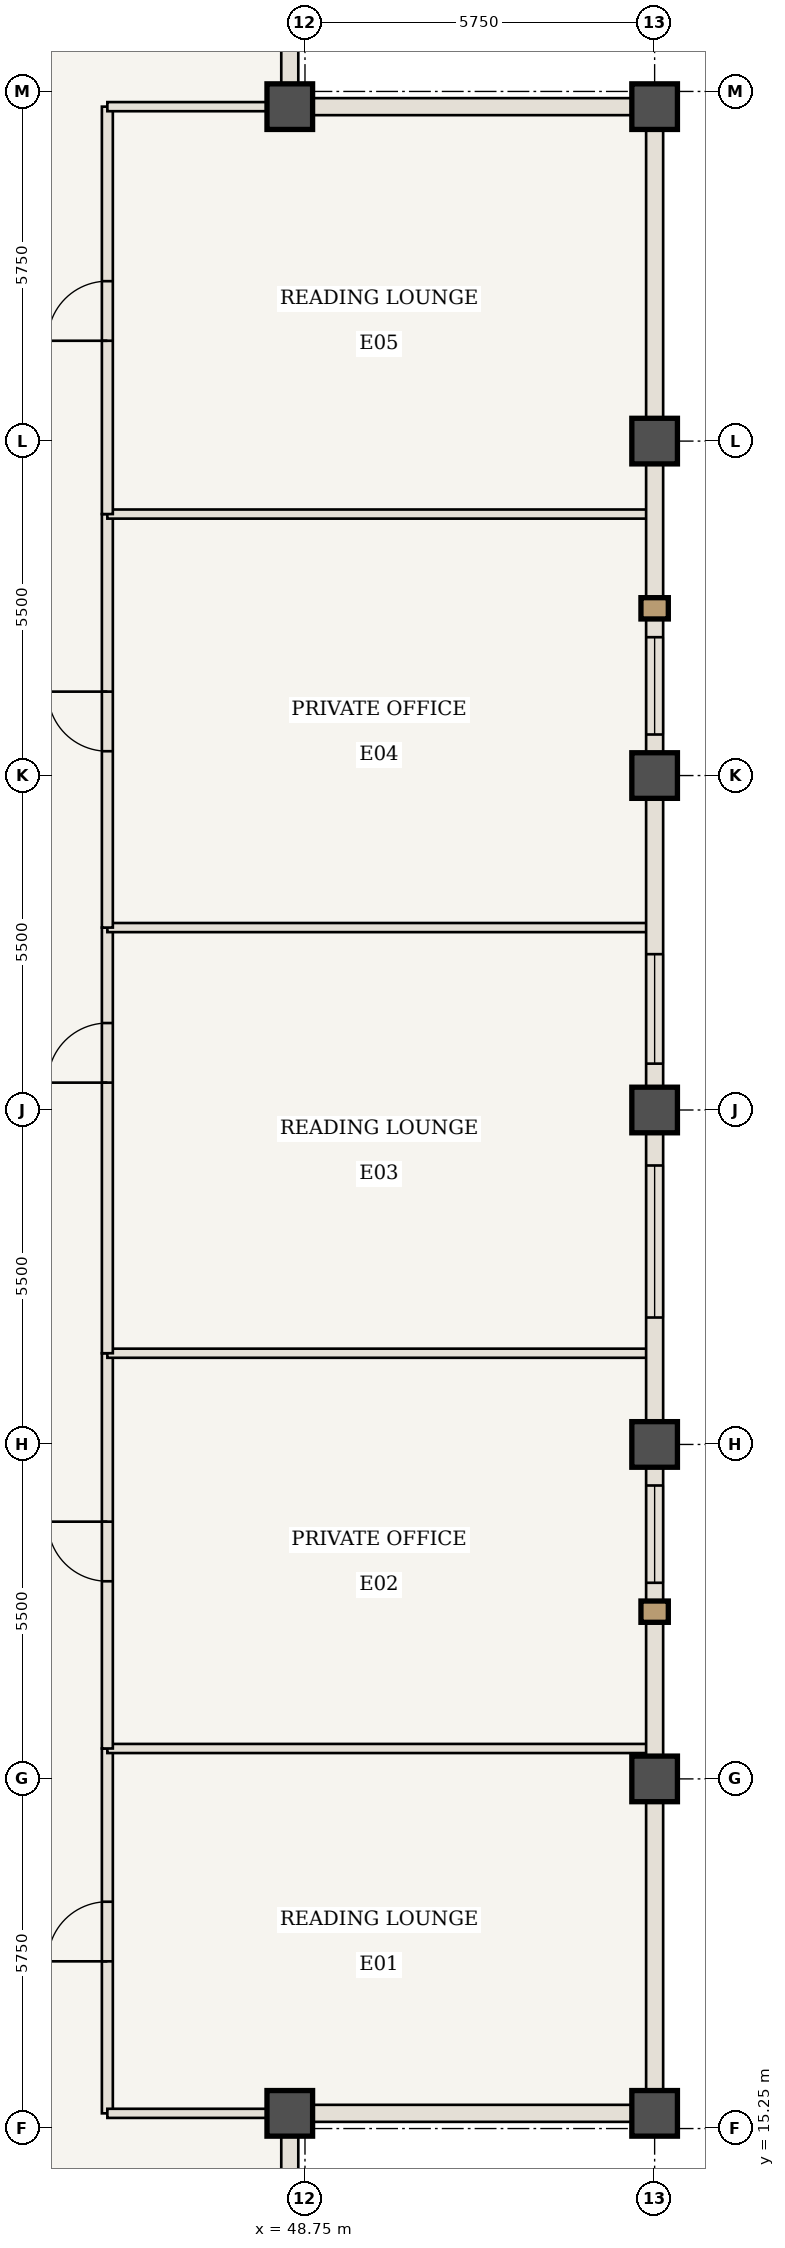
"""IFC4 building model, lengths in metres.
Left out: names, types, materials, properties, quantities, classifications, styles, units other than length and angle.
Written with IfcOpenShell. Run it as: python <this file> out.ifc"""

import sys

from ifc_helpers import new_model, si_unit, direction, frame, frame_2d, origin, origin_2d, place, context, subcontext, project, spatial, rectangle, extrude, element, fill, save


model = new_model("IFC4")
c1 = context("Model", 3, precision=1e-05, world=origin(), true_north=direction((0.0, 1.0)))
c2 = subcontext(c1, "Body", "Model", "MODEL_VIEW")
j1 = project(units=[si_unit("LENGTHUNIT", "METRE"), si_unit("PLANEANGLEUNIT", "RADIAN")], contexts=[c1])
p1 = place(None, origin())
s1 = spatial("IfcSite", under=j1, at=p1, CompositionType="ELEMENT")
p2 = place(p1, origin())
s2 = spatial("IfcBuilding", under=s1, at=p2, CompositionType="ELEMENT")
p3 = place(p2, frame((0.0, 0.0, 292.95)))
s3 = spatial("IfcBuildingStorey", under=s2, at=p3, CompositionType="ELEMENT", Elevation=292.95)
for number, where, z_axis, x_axis in (
    (1, (48.5, 15.5, 0.0), (0.0, 0.0, 1.0), (1.0, 0.0, 0.0)),
    (2, (54.5, 15.5, 0.0), (0.0, 0.0, 1.0), (1.0, 0.0, 0.0)),
    (3, (54.5, 48.5, 0.0), (0.0, 0.0, 1.0), (1.0, 0.0, 0.0)),
    (4, (48.5, 48.5, 0.0), (0.0, 0.0, 1.0), (1.0, 0.0, 0.0)),
    (5, (54.5, 21.0, 0.0), (0.0, 0.0, 1.0), (1.0, 0.0, 0.0)),
    (6, (54.5, 26.5, 0.0), (0.0, 0.0, 1.0), (1.0, 0.0, 0.0)),
    (7, (54.5, 32.0, 0.0), (0.0, 0.0, 1.0), (1.0, 0.0, 0.0)),
    (8, (54.5, 37.5, 0.0), (0.0, 0.0, 1.0), (1.0, 0.0, 0.0)),
    (9, (54.5, 43.0, 0.0), (0.0, 0.0, 1.0), (1.0, 0.0, 0.0)),
):
    element("IfcColumn", number, at=place(p3, frame(where, z_axis=z_axis, x_axis=x_axis)), inside=s3, PredefinedType="COLUMN", context=c2, shape_type="SweptSolid", body=[
        extrude(rectangle(XDim=0.75, YDim=0.75, at=origin_2d()), origin(), (0.0, 0.0, 1.0), 3.85),
    ])
p4 = place(p3, frame((45.5, 15.5, 0.0), z_axis=(0.0, 0.0, 1.0), x_axis=(0.0, 1.0, 0.0)))
e10 = element("IfcWall", 10, at=p4, inside=s3, PredefinedType="STANDARD", context=c2, shape_type="SweptSolid", body=[
    extrude(rectangle(XDim=6.0, YDim=0.18, at=frame_2d((3.0, 0.0))), origin(), (0.0, 0.0, 1.0), 3.685),
])
p5 = place(p4, frame((2.5, 0.0, 0.0)))
e11 = element("IfcOpeningElement", 11, at=p5, cuts=e10, PredefinedType="OPENING", context=c2, shape_type="SweptSolid", body=[
    extrude(rectangle(XDim=0.98, YDim=2.2, at=frame_2d((0.49, 1.1))), frame((0.0, 0.1, 0.0), z_axis=(0.0, -1.0, 0.0), x_axis=(1.0, 0.0, 0.0)), (0.0, 0.0, 1.0), 0.2),
])
p6 = place(p3, frame((45.5, 21.5, 0.0), z_axis=(0.0, 0.0, 1.0), x_axis=(1.0, 0.0, 0.0)))
e12 = element("IfcWall", 12, at=p6, inside=s3, PredefinedType="STANDARD", context=c2, shape_type="SweptSolid", body=[
    extrude(rectangle(XDim=8.94, YDim=0.15, at=frame_2d((4.47, 0.0))), origin(), (0.0, 0.0, 1.0), 3.685),
])
p7 = place(p3, frame((45.5, 21.5, 0.0), z_axis=(0.0, 0.0, 1.0), x_axis=(0.0, 1.0, 0.0)))
e13 = element("IfcWall", 13, at=p7, inside=s3, PredefinedType="STANDARD", context=c2, shape_type="SweptSolid", body=[
    extrude(rectangle(XDim=6.5, YDim=0.18, at=frame_2d((3.25, 0.0))), origin(), (0.0, 0.0, 1.0), 3.685),
])
p8 = place(p7, frame((2.75, 0.0, 0.0)))
e14 = element("IfcOpeningElement", 14, at=p8, cuts=e13, PredefinedType="OPENING", context=c2, shape_type="SweptSolid", body=[
    extrude(rectangle(XDim=0.98, YDim=2.2, at=frame_2d((0.49, 1.1))), frame((0.0, 0.1, 0.0), z_axis=(0.0, -1.0, 0.0), x_axis=(1.0, 0.0, 0.0)), (0.0, 0.0, 1.0), 0.2),
])
p9 = place(p3, frame((45.5, 28.0, 0.0), z_axis=(0.0, 0.0, 1.0), x_axis=(1.0, 0.0, 0.0)))
e15 = element("IfcWall", 15, at=p9, inside=s3, PredefinedType="STANDARD", context=c2, shape_type="SweptSolid", body=[
    extrude(rectangle(XDim=8.94, YDim=0.15, at=frame_2d((4.47, 0.0))), origin(), (0.0, 0.0, 1.0), 3.685),
])
p10 = place(p3, frame((45.5, 28.0, 0.0), z_axis=(0.0, 0.0, 1.0), x_axis=(0.0, 1.0, 0.0)))
e16 = element("IfcWall", 16, at=p10, inside=s3, PredefinedType="STANDARD", context=c2, shape_type="SweptSolid", body=[
    extrude(rectangle(XDim=7.0, YDim=0.18, at=frame_2d((3.5, 0.0))), origin(), (0.0, 0.0, 1.0), 3.685),
])
p11 = place(p10, frame((4.45, 0.0, 0.0)))
e17 = element("IfcOpeningElement", 17, at=p11, cuts=e16, PredefinedType="OPENING", context=c2, shape_type="SweptSolid", body=[
    extrude(rectangle(XDim=0.98, YDim=2.2, at=frame_2d((0.49, 1.1))), frame((0.0, 0.1, 0.0), z_axis=(0.0, -1.0, 0.0), x_axis=(1.0, 0.0, 0.0)), (0.0, 0.0, 1.0), 0.2),
])
p12 = place(p3, frame((45.5, 35.0, 0.0), z_axis=(0.0, 0.0, 1.0), x_axis=(1.0, 0.0, 0.0)))
e18 = element("IfcWall", 18, at=p12, inside=s3, PredefinedType="STANDARD", context=c2, shape_type="SweptSolid", body=[
    extrude(rectangle(XDim=8.94, YDim=0.15, at=frame_2d((4.47, 0.0))), origin(), (0.0, 0.0, 1.0), 3.685),
])
p13 = place(p3, frame((45.5, 35.0, 0.0), z_axis=(0.0, 0.0, 1.0), x_axis=(0.0, 1.0, 0.0)))
e19 = element("IfcWall", 19, at=p13, inside=s3, PredefinedType="STANDARD", context=c2, shape_type="SweptSolid", body=[
    extrude(rectangle(XDim=6.8, YDim=0.18, at=frame_2d((3.4, 0.0))), origin(), (0.0, 0.0, 1.0), 3.685),
])
p14 = place(p13, frame((2.9, 0.0, 0.0)))
e20 = element("IfcOpeningElement", 20, at=p14, cuts=e19, PredefinedType="OPENING", context=c2, shape_type="SweptSolid", body=[
    extrude(rectangle(XDim=0.98, YDim=2.2, at=frame_2d((0.49, 1.1))), frame((0.0, 0.1, 0.0), z_axis=(0.0, -1.0, 0.0), x_axis=(1.0, 0.0, 0.0)), (0.0, 0.0, 1.0), 0.2),
])
p15 = place(p3, frame((45.5, 41.8, 0.0), z_axis=(0.0, 0.0, 1.0), x_axis=(1.0, 0.0, 0.0)))
e21 = element("IfcWall", 21, at=p15, inside=s3, PredefinedType="STANDARD", context=c2, shape_type="SweptSolid", body=[
    extrude(rectangle(XDim=8.94, YDim=0.15, at=frame_2d((4.47, 0.0))), origin(), (0.0, 0.0, 1.0), 3.685),
])
p16 = place(p3, frame((45.5, 41.8, 0.0), z_axis=(0.0, 0.0, 1.0), x_axis=(0.0, 1.0, 0.0)))
e22 = element("IfcWall", 22, at=p16, inside=s3, PredefinedType="STANDARD", context=c2, shape_type="SweptSolid", body=[
    extrude(rectangle(XDim=6.7, YDim=0.18, at=frame_2d((3.35, 0.0))), origin(), (0.0, 0.0, 1.0), 3.685),
])
p17 = place(p16, frame((2.85, 0.0, 0.0)))
e23 = element("IfcOpeningElement", 23, at=p17, cuts=e22, PredefinedType="OPENING", context=c2, shape_type="SweptSolid", body=[
    extrude(rectangle(XDim=0.98, YDim=2.2, at=frame_2d((0.49, 1.1))), frame((0.0, 0.1, 0.0), z_axis=(0.0, -1.0, 0.0), x_axis=(1.0, 0.0, 0.0)), (0.0, 0.0, 1.0), 0.2),
])
for number, where, z_axis, x_axis in (
    (24, (45.5, 15.5, 0.0), (0.0, 0.0, 1.0), (1.0, 0.0, 0.0)),
    (25, (45.5, 48.5, 0.0), (0.0, 0.0, 1.0), (1.0, 0.0, 0.0)),
):
    element("IfcWall", number, at=place(p3, frame(where, z_axis=z_axis, x_axis=x_axis)), inside=s3, PredefinedType="STANDARD", context=c2, shape_type="SweptSolid", body=[
        extrude(rectangle(XDim=3.0, YDim=0.15, at=frame_2d((1.5, 0.0))), origin(), (0.0, 0.0, 1.0), 3.685),
    ])
p18 = place(p3, frame((54.5, 21.0, 0.0), z_axis=(0.0, 0.0, 1.0), x_axis=(0.0, -1.0, 0.0)))
e26 = element("IfcWall", 26, at=p18, inside=s3, PredefinedType="USERDEFINED", context=c2, shape_type="SweptSolid", body=[
    extrude(rectangle(XDim=5.5, YDim=0.28, at=frame_2d((2.75, 0.0))), origin(), (0.0, 0.0, 1.0), 2.985),
])
p19 = place(p3, frame((54.5, 26.5, 0.0), z_axis=(0.0, 0.0, 1.0), x_axis=(0.0, -1.0, 0.0)))
e27 = element("IfcWall", 27, at=p19, inside=s3, PredefinedType="USERDEFINED", context=c2, shape_type="SweptSolid", body=[
    extrude(rectangle(XDim=5.5, YDim=0.28, at=frame_2d((2.75, 0.0))), origin(), (0.0, 0.0, 1.0), 2.985),
])
p20 = place(p19, frame((0.675, 0.0, 0.85)))
e28 = element("IfcOpeningElement", 28, at=p20, cuts=e27, PredefinedType="OPENING", context=c2, shape_type="SweptSolid", body=[
    extrude(rectangle(XDim=1.6, YDim=1.935, at=frame_2d((0.8, 0.968))), frame((0.0, 0.15, 0.0), z_axis=(0.0, -1.0, 0.0), x_axis=(1.0, 0.0, 0.0)), (0.0, 0.0, 1.0), 0.3),
])
p21 = place(p3, frame((54.5, 32.0, 0.0), z_axis=(0.0, 0.0, 1.0), x_axis=(0.0, -1.0, 0.0)))
e29 = element("IfcWall", 29, at=p21, inside=s3, PredefinedType="USERDEFINED", context=c2, shape_type="SweptSolid", body=[
    extrude(rectangle(XDim=5.5, YDim=0.28, at=frame_2d((2.75, 0.0))), origin(), (0.0, 0.0, 1.0), 2.985),
])
p22 = place(p21, frame((0.913, 0.0, 0.85)))
e30 = element("IfcOpeningElement", 30, at=p22, cuts=e29, PredefinedType="OPENING", context=c2, shape_type="SweptSolid", body=[
    extrude(rectangle(XDim=2.5, YDim=1.935, at=frame_2d((1.25, 0.968))), frame((0.0, 0.15, 0.0), z_axis=(0.0, -1.0, 0.0), x_axis=(1.0, 0.0, 0.0)), (0.0, 0.0, 1.0), 0.3),
])
p23 = place(p3, frame((54.5, 37.5, 0.0), z_axis=(0.0, 0.0, 1.0), x_axis=(0.0, -1.0, 0.0)))
e31 = element("IfcWall", 31, at=p23, inside=s3, PredefinedType="USERDEFINED", context=c2, shape_type="SweptSolid", body=[
    extrude(rectangle(XDim=5.5, YDim=0.28, at=frame_2d((2.75, 0.0))), origin(), (0.0, 0.0, 1.0), 2.985),
])
p24 = place(p23, frame((2.938, 0.0, 0.85)))
e32 = element("IfcOpeningElement", 32, at=p24, cuts=e31, PredefinedType="OPENING", context=c2, shape_type="SweptSolid", body=[
    extrude(rectangle(XDim=1.8, YDim=1.935, at=frame_2d((0.9, 0.968))), frame((0.0, 0.15, 0.0), z_axis=(0.0, -1.0, 0.0), x_axis=(1.0, 0.0, 0.0)), (0.0, 0.0, 1.0), 0.3),
])
p25 = place(p3, frame((54.5, 43.0, 0.0), z_axis=(0.0, 0.0, 1.0), x_axis=(0.0, -1.0, 0.0)))
e33 = element("IfcWall", 33, at=p25, inside=s3, PredefinedType="USERDEFINED", context=c2, shape_type="SweptSolid", body=[
    extrude(rectangle(XDim=5.5, YDim=0.28, at=frame_2d((2.75, 0.0))), origin(), (0.0, 0.0, 1.0), 2.985),
])
p26 = place(p25, frame((3.225, 0.0, 0.85)))
e34 = element("IfcOpeningElement", 34, at=p26, cuts=e33, PredefinedType="OPENING", context=c2, shape_type="SweptSolid", body=[
    extrude(rectangle(XDim=1.6, YDim=1.935, at=frame_2d((0.8, 0.968))), frame((0.0, 0.15, 0.0), z_axis=(0.0, -1.0, 0.0), x_axis=(1.0, 0.0, 0.0)), (0.0, 0.0, 1.0), 0.3),
])
p27 = place(p3, frame((54.5, 48.5, 0.0), z_axis=(0.0, 0.0, 1.0), x_axis=(0.0, -1.0, 0.0)))
e35 = element("IfcWall", 35, at=p27, inside=s3, PredefinedType="USERDEFINED", context=c2, shape_type="SweptSolid", body=[
    extrude(rectangle(XDim=5.5, YDim=0.28, at=frame_2d((2.75, 0.0))), origin(), (0.0, 0.0, 1.0), 2.985),
])
for number, where, z_axis, x_axis in (
    (36, (48.5, 15.5, 0.0), (0.0, 0.0, 1.0), (0.0, -1.0, 0.0)),
    (37, (54.5, 15.5, 0.0), (0.0, 0.0, 1.0), (-1.0, 0.0, 0.0)),
    (38, (48.5, 48.5, 0.0), (0.0, 0.0, 1.0), (1.0, 0.0, 0.0)),
    (39, (48.5, 54.5, 0.0), (0.0, 0.0, 1.0), (0.0, -1.0, 0.0)),
):
    element("IfcWall", number, at=place(p3, frame(where, z_axis=z_axis, x_axis=x_axis)), inside=s3, PredefinedType="USERDEFINED", context=c2, shape_type="SweptSolid", body=[
        extrude(rectangle(XDim=6.0, YDim=0.28, at=frame_2d((3.0, 0.0))), origin(), (0.0, 0.0, 1.0), 2.985),
    ])
p28 = place(p5, origin())
e40 = element("IfcDoor", 40, at=p28, inside=s3, OperationType="SINGLE_SWING_LEFT", PredefinedType="DOOR", context=c2, shape_type="SweptSolid", body=[
    extrude(rectangle(XDim=0.98, YDim=2.2, at=frame_2d((0.49, 1.1))), frame((0.0, 0.025, 0.0), z_axis=(0.0, -1.0, 0.0), x_axis=(1.0, 0.0, 0.0)), (0.0, 0.0, 1.0), 0.05),
])
fill(e11, e40)
p29 = place(p8, origin())
e41 = element("IfcDoor", 41, at=p29, inside=s3, OperationType="SINGLE_SWING_RIGHT", PredefinedType="DOOR", context=c2, shape_type="SweptSolid", body=[
    extrude(rectangle(XDim=0.98, YDim=2.2, at=frame_2d((0.49, 1.1))), frame((0.0, 0.025, 0.0), z_axis=(0.0, -1.0, 0.0), x_axis=(1.0, 0.0, 0.0)), (0.0, 0.0, 1.0), 0.05),
])
fill(e14, e41)
p30 = place(p11, origin())
e42 = element("IfcDoor", 42, at=p30, inside=s3, OperationType="SINGLE_SWING_LEFT", PredefinedType="DOOR", context=c2, shape_type="SweptSolid", body=[
    extrude(rectangle(XDim=0.98, YDim=2.2, at=frame_2d((0.49, 1.1))), frame((0.0, 0.025, 0.0), z_axis=(0.0, -1.0, 0.0), x_axis=(1.0, 0.0, 0.0)), (0.0, 0.0, 1.0), 0.05),
])
fill(e17, e42)
p31 = place(p14, origin())
e43 = element("IfcDoor", 43, at=p31, inside=s3, OperationType="SINGLE_SWING_RIGHT", PredefinedType="DOOR", context=c2, shape_type="SweptSolid", body=[
    extrude(rectangle(XDim=0.98, YDim=2.2, at=frame_2d((0.49, 1.1))), frame((0.0, 0.025, 0.0), z_axis=(0.0, -1.0, 0.0), x_axis=(1.0, 0.0, 0.0)), (0.0, 0.0, 1.0), 0.05),
])
fill(e20, e43)
p32 = place(p17, origin())
e44 = element("IfcDoor", 44, at=p32, inside=s3, OperationType="SINGLE_SWING_LEFT", PredefinedType="DOOR", context=c2, shape_type="SweptSolid", body=[
    extrude(rectangle(XDim=0.98, YDim=2.2, at=frame_2d((0.49, 1.1))), frame((0.0, 0.025, 0.0), z_axis=(0.0, -1.0, 0.0), x_axis=(1.0, 0.0, 0.0)), (0.0, 0.0, 1.0), 0.05),
])
fill(e23, e44)
p33 = place(p20, origin())
e45 = element("IfcWindow", 45, at=p33, inside=s3, PartitioningType="SINGLE_PANEL", PredefinedType="WINDOW", context=c2, shape_type="SweptSolid", body=[
    extrude(rectangle(XDim=1.6, YDim=1.935, at=frame_2d((0.8, 0.968))), frame((0.0, 0.03, 0.0), z_axis=(0.0, -1.0, 0.0), x_axis=(1.0, 0.0, 0.0)), (0.0, 0.0, 1.0), 0.06),
])
fill(e28, e45)
p34 = place(p22, origin())
e46 = element("IfcWindow", 46, at=p34, inside=s3, PartitioningType="SINGLE_PANEL", PredefinedType="WINDOW", context=c2, shape_type="SweptSolid", body=[
    extrude(rectangle(XDim=2.5, YDim=1.935, at=frame_2d((1.25, 0.968))), frame((0.0, 0.03, 0.0), z_axis=(0.0, -1.0, 0.0), x_axis=(1.0, 0.0, 0.0)), (0.0, 0.0, 1.0), 0.06),
])
fill(e30, e46)
p35 = place(p24, origin())
e47 = element("IfcWindow", 47, at=p35, inside=s3, PartitioningType="SINGLE_PANEL", PredefinedType="WINDOW", context=c2, shape_type="SweptSolid", body=[
    extrude(rectangle(XDim=1.8, YDim=1.935, at=frame_2d((0.9, 0.968))), frame((0.0, 0.03, 0.0), z_axis=(0.0, -1.0, 0.0), x_axis=(1.0, 0.0, 0.0)), (0.0, 0.0, 1.0), 0.06),
])
fill(e32, e47)
p36 = place(p26, origin())
e48 = element("IfcWindow", 48, at=p36, inside=s3, PartitioningType="SINGLE_PANEL", PredefinedType="WINDOW", context=c2, shape_type="SweptSolid", body=[
    extrude(rectangle(XDim=1.6, YDim=1.935, at=frame_2d((0.8, 0.968))), frame((0.0, 0.03, 0.0), z_axis=(0.0, -1.0, 0.0), x_axis=(1.0, 0.0, 0.0)), (0.0, 0.0, 1.0), 0.06),
])
fill(e34, e48)
save(model, sys.argv[1])
